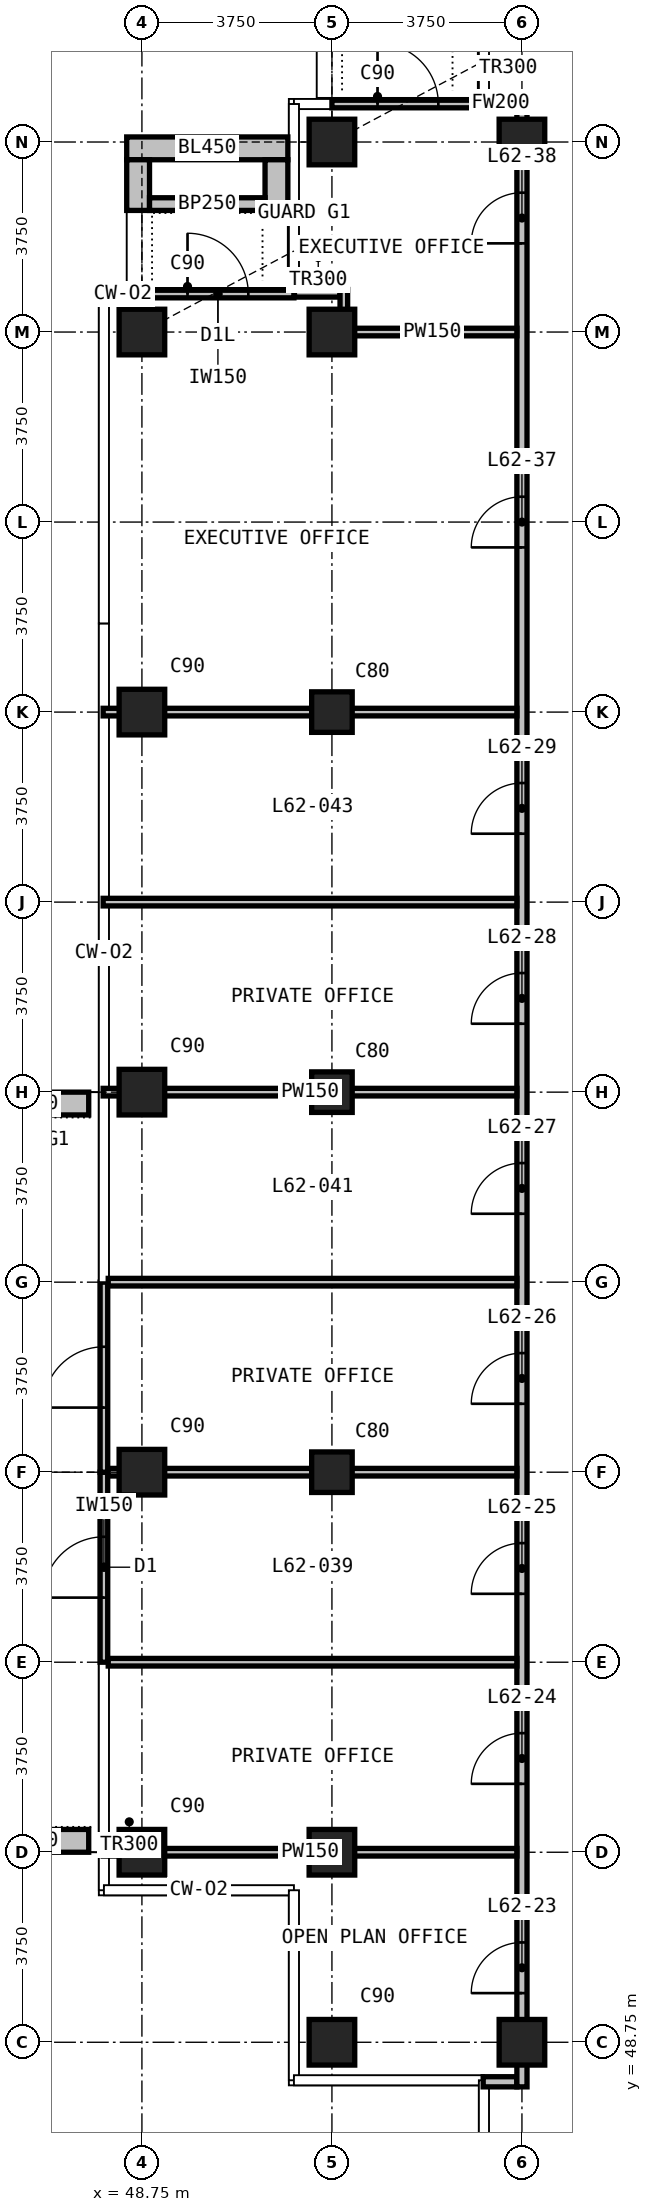
"""IFC4 building model, lengths in metres.
Left out: names, types, materials, properties, quantities, classifications, styles, units other than length and angle.
Written with IfcOpenShell. Run it as: python <this file> out.ifc"""

import sys

from ifc_helpers import new_model, si_unit, direction, frame, frame_2d, origin, origin_2d, place, context, subcontext, project, spatial, rectangle, extrude, element, fill, save


model = new_model("IFC4")
c1 = context("Model", 3, precision=1e-05, world=origin(), true_north=direction((0.0, 1.0)))
c2 = subcontext(c1, "Body", "Model", "MODEL_VIEW")
j1 = project(units=[si_unit("LENGTHUNIT", "METRE"), si_unit("PLANEANGLEUNIT", "RADIAN")], contexts=[c1])
p1 = place(None, origin())
s1 = spatial("IfcSite", under=j1, at=p1, CompositionType="ELEMENT")
p2 = place(p1, origin())
s2 = spatial("IfcBuilding", under=s1, at=p2, CompositionType="ELEMENT")
p3 = place(p2, frame((0.0, 0.0, 239.1)))
s3 = spatial("IfcBuildingStorey", under=s2, at=p3, CompositionType="ELEMENT", Elevation=239.1)
for number, where, z_axis, x_axis in (
    (1, (48.75, 52.5, 0.0), (0.0, 0.0, 1.0), (1.0, 0.0, 0.0)),
    (2, (48.75, 60.0, 0.0), (0.0, 0.0, 1.0), (1.0, 0.0, 0.0)),
    (3, (48.75, 67.5, 0.0), (0.0, 0.0, 1.0), (1.0, 0.0, 0.0)),
    (4, (48.75, 75.0, 0.0), (0.0, 0.0, 1.0), (1.0, 0.0, 0.0)),
    (5, (48.75, 82.5, 0.0), (0.0, 0.0, 1.0), (1.0, 0.0, 0.0)),
    (6, (52.5, 48.75, 0.0), (0.0, 0.0, 1.0), (1.0, 0.0, 0.0)),
    (7, (52.5, 52.5, 0.0), (0.0, 0.0, 1.0), (1.0, 0.0, 0.0)),
):
    element("IfcColumn", number, at=place(p3, frame(where, z_axis=z_axis, x_axis=x_axis)), inside=s3, PredefinedType="COLUMN", context=c2, shape_type="SweptSolid", body=[
        extrude(rectangle(XDim=0.9, YDim=0.9, at=origin_2d()), origin(), (0.0, 0.0, 1.0), 3.6),
    ])
for number, where, z_axis, x_axis in (
    (8, (52.5, 60.0, 0.0), (0.0, 0.0, 1.0), (1.0, 0.0, 0.0)),
    (9, (52.5, 67.5, 0.0), (0.0, 0.0, 1.0), (1.0, 0.0, 0.0)),
    (10, (52.5, 75.0, 0.0), (0.0, 0.0, 1.0), (1.0, 0.0, 0.0)),
):
    element("IfcColumn", number, at=place(p3, frame(where, z_axis=z_axis, x_axis=x_axis)), inside=s3, PredefinedType="COLUMN", context=c2, shape_type="SweptSolid", body=[
        extrude(rectangle(XDim=0.8, YDim=0.8, at=origin_2d()), origin(), (0.0, 0.0, 1.0), 3.6),
    ])
for number, where, z_axis, x_axis in (
    (11, (52.5, 82.5, 0.0), (0.0, 0.0, 1.0), (1.0, 0.0, 0.0)),
    (12, (52.5, 86.25, 0.0), (0.0, 0.0, 1.0), (1.0, 0.0, 0.0)),
    (13, (56.25, 48.75, 0.0), (0.0, 0.0, 1.0), (1.0, 0.0, 0.0)),
    (14, (56.25, 86.25, 0.0), (0.0, 0.0, 1.0), (1.0, 0.0, 0.0)),
):
    element("IfcColumn", number, at=place(p3, frame(where, z_axis=z_axis, x_axis=x_axis)), inside=s3, PredefinedType="COLUMN", context=c2, shape_type="SweptSolid", body=[
        extrude(rectangle(XDim=0.9, YDim=0.9, at=origin_2d()), origin(), (0.0, 0.0, 1.0), 3.6),
    ])
p4 = place(p3, frame((52.5, 87.0, 0.0), z_axis=(0.0, 0.0, 1.0), x_axis=(1.0, 0.0, 0.0)))
e15 = element("IfcWall", 15, at=p4, inside=s3, PredefinedType="SOLIDWALL", context=c2, shape_type="SweptSolid", body=[
    extrude(rectangle(XDim=3.0, YDim=0.15, at=frame_2d((1.5, 0.0))), origin(), (0.0, 0.0, 1.0), 3.3),
])
p5 = place(p4, frame((0.9, 0.0, 0.0)))
e16 = element("IfcOpeningElement", 16, at=p5, cuts=e15, PredefinedType="OPENING", context=c2, shape_type="SweptSolid", body=[
    extrude(rectangle(XDim=1.2, YDim=2.0, at=frame_2d((0.6, 1.0))), frame((0.0, 0.085, 0.0), z_axis=(0.0, -1.0, 0.0), x_axis=(1.0, 0.0, 0.0)), (0.0, 0.0, 1.0), 0.17),
])
p6 = place(p3, frame((48.75, 83.25, 0.0), z_axis=(0.0, 0.0, 1.0), x_axis=(1.0, 0.0, 0.0)))
e17 = element("IfcWall", 17, at=p6, inside=s3, PredefinedType="SOLIDWALL", context=c2, shape_type="SweptSolid", body=[
    extrude(rectangle(XDim=3.0, YDim=0.15, at=frame_2d((1.5, 0.0))), origin(), (0.0, 0.0, 1.0), 3.3),
])
p7 = place(p6, frame((0.9, 0.0, 0.0)))
e18 = element("IfcOpeningElement", 18, at=p7, cuts=e17, PredefinedType="OPENING", context=c2, shape_type="SweptSolid", body=[
    extrude(rectangle(XDim=1.2, YDim=2.0, at=frame_2d((0.6, 1.0))), frame((0.0, 0.085, 0.0), z_axis=(0.0, -1.0, 0.0), x_axis=(1.0, 0.0, 0.0)), (0.0, 0.0, 1.0), 0.17),
])
p8 = place(p3, frame((48.0, 56.25, 0.0), z_axis=(0.0, 0.0, 1.0), x_axis=(0.0, 1.0, 0.0)))
e19 = element("IfcWall", 19, at=p8, inside=s3, PredefinedType="SOLIDWALL", context=c2, shape_type="SweptSolid", body=[
    extrude(rectangle(XDim=3.75, YDim=0.15, at=frame_2d((1.875, 0.0))), origin(), (0.0, 0.0, 1.0), 3.3),
])
p9 = place(p8, frame((1.275, 0.0, 0.0)))
e20 = element("IfcOpeningElement", 20, at=p9, cuts=e19, PredefinedType="OPENING", context=c2, shape_type="SweptSolid", body=[
    extrude(rectangle(XDim=1.2, YDim=2.4, at=frame_2d((0.6, 1.2))), frame((0.0, 0.085, 0.0), z_axis=(0.0, -1.0, 0.0), x_axis=(1.0, 0.0, 0.0)), (0.0, 0.0, 1.0), 0.17),
])
p10 = place(p3, frame((48.0, 60.0, 0.0), z_axis=(0.0, 0.0, 1.0), x_axis=(0.0, 1.0, 0.0)))
e21 = element("IfcWall", 21, at=p10, inside=s3, PredefinedType="SOLIDWALL", context=c2, shape_type="SweptSolid", body=[
    extrude(rectangle(XDim=3.75, YDim=0.15, at=frame_2d((1.875, 0.0))), origin(), (0.0, 0.0, 1.0), 3.3),
])
p11 = place(p10, frame((1.275, 0.0, 0.0)))
e22 = element("IfcOpeningElement", 22, at=p11, cuts=e21, PredefinedType="OPENING", context=c2, shape_type="SweptSolid", body=[
    extrude(rectangle(XDim=1.2, YDim=2.4, at=frame_2d((0.6, 1.2))), frame((0.0, 0.085, 0.0), z_axis=(0.0, -1.0, 0.0), x_axis=(1.0, 0.0, 0.0)), (0.0, 0.0, 1.0), 0.17),
])
p12 = place(p3, frame((48.45, 86.125, 0.0), z_axis=(0.0, 0.0, 1.0), x_axis=(1.0, 0.0, 0.0)))
e23 = element("IfcWall", 23, at=p12, inside=s3, PredefinedType="USERDEFINED", context=c2, shape_type="SweptSolid", body=[
    extrude(rectangle(XDim=3.18, YDim=0.45, at=frame_2d((1.59, 0.0))), origin(), (0.0, 0.0, 1.0), 1.1),
])
for number, where, z_axis, x_axis in (
    (24, (48.675, 84.9, 0.0), (0.0, 0.0, 1.0), (0.0, 1.0, 0.0)),
    (25, (51.405, 84.9, 0.0), (0.0, 0.0, 1.0), (0.0, 1.0, 0.0)),
):
    element("IfcWall", number, at=place(p3, frame(where, z_axis=z_axis, x_axis=x_axis)), inside=s3, PredefinedType="USERDEFINED", context=c2, shape_type="SweptSolid", body=[
        extrude(rectangle(XDim=1.0, YDim=0.45, at=frame_2d((0.5, 0.0))), origin(), (0.0, 0.0, 1.0), 1.1),
    ])
p13 = place(p3, frame((48.9, 85.025, 0.0), z_axis=(0.0, 0.0, 1.0), x_axis=(1.0, 0.0, 0.0)))
e26 = element("IfcWall", 26, at=p13, inside=s3, PredefinedType="USERDEFINED", context=c2, shape_type="SweptSolid", body=[
    extrude(rectangle(XDim=2.28, YDim=0.25, at=frame_2d((1.14, 0.0))), origin(), (0.0, 0.0, 1.0), 1.0),
])
for number, where, z_axis, x_axis in (
    (27, (47.7, 52.725, 0.0), (0.0, 0.0, 1.0), (-1.0, 0.0, 0.0)),
    (28, (47.7, 67.275, 0.0), (0.0, 0.0, 1.0), (-1.0, 0.0, 0.0)),
):
    element("IfcWall", number, at=place(p3, frame(where, z_axis=z_axis, x_axis=x_axis)), inside=s3, PredefinedType="USERDEFINED", context=c2, shape_type="SweptSolid", body=[
        extrude(rectangle(XDim=2.35, YDim=0.45, at=frame_2d((1.175, 0.0))), origin(), (0.0, 0.0, 1.0), 1.1),
    ])
p14 = place(p3, frame((55.485, 47.97, 0.0), z_axis=(0.0, 0.0, 1.0), x_axis=(1.0, 0.0, 0.0)))
e29 = element("IfcWall", 29, at=p14, inside=s3, PredefinedType="PARTITIONING", context=c2, shape_type="SweptSolid", body=[
    extrude(rectangle(XDim=0.665, YDim=0.2, at=frame_2d((0.333, 0.0))), origin(), (0.0, 0.0, 1.0), 3.3),
])
p15 = place(p3, frame((55.51, 87.03, 0.0), z_axis=(0.0, 0.0, 1.0), x_axis=(1.0, 0.0, 0.0)))
e30 = element("IfcWall", 30, at=p15, inside=s3, PredefinedType="PARTITIONING", context=c2, shape_type="SweptSolid", body=[
    extrude(rectangle(XDim=0.64, YDim=0.2, at=frame_2d((0.32, 0.0))), origin(), (0.0, 0.0, 1.0), 3.3),
])
p16 = place(p3, frame((56.25, 47.87, 0.0), z_axis=(0.0, 0.0, 1.0), x_axis=(0.0, 1.0, 0.0)))
e31 = element("IfcWall", 31, at=p16, inside=s3, PredefinedType="PARTITIONING", context=c2, shape_type="SweptSolid", body=[
    extrude(rectangle(XDim=39.26, YDim=0.2, at=frame_2d((19.63, 0.0))), origin(), (0.0, 0.0, 1.0), 3.3),
])
p17 = place(p16, frame((1.85, 0.0, 0.0)))
e32 = element("IfcOpeningElement", 32, at=p17, cuts=e31, PredefinedType="OPENING", context=c2, shape_type="SweptSolid", body=[
    extrude(rectangle(XDim=1.0, YDim=2.2, at=frame_2d((0.5, 1.1))), frame((0.0, 0.11, 0.0), z_axis=(0.0, -1.0, 0.0), x_axis=(1.0, 0.0, 0.0)), (0.0, 0.0, 1.0), 0.22),
])
p18 = place(p16, frame((5.98, 0.0, 0.0)))
e33 = element("IfcOpeningElement", 33, at=p18, cuts=e31, PredefinedType="OPENING", context=c2, shape_type="SweptSolid", body=[
    extrude(rectangle(XDim=1.0, YDim=2.2, at=frame_2d((0.5, 1.1))), frame((0.0, 0.11, 0.0), z_axis=(0.0, -1.0, 0.0), x_axis=(1.0, 0.0, 0.0)), (0.0, 0.0, 1.0), 0.22),
])
p19 = place(p16, frame((9.73, 0.0, 0.0)))
e34 = element("IfcOpeningElement", 34, at=p19, cuts=e31, PredefinedType="OPENING", context=c2, shape_type="SweptSolid", body=[
    extrude(rectangle(XDim=1.0, YDim=2.2, at=frame_2d((0.5, 1.1))), frame((0.0, 0.11, 0.0), z_axis=(0.0, -1.0, 0.0), x_axis=(1.0, 0.0, 0.0)), (0.0, 0.0, 1.0), 0.22),
])
p20 = place(p16, frame((13.48, 0.0, 0.0)))
e35 = element("IfcOpeningElement", 35, at=p20, cuts=e31, PredefinedType="OPENING", context=c2, shape_type="SweptSolid", body=[
    extrude(rectangle(XDim=1.0, YDim=2.2, at=frame_2d((0.5, 1.1))), frame((0.0, 0.11, 0.0), z_axis=(0.0, -1.0, 0.0), x_axis=(1.0, 0.0, 0.0)), (0.0, 0.0, 1.0), 0.22),
])
p21 = place(p16, frame((17.23, 0.0, 0.0)))
e36 = element("IfcOpeningElement", 36, at=p21, cuts=e31, PredefinedType="OPENING", context=c2, shape_type="SweptSolid", body=[
    extrude(rectangle(XDim=1.0, YDim=2.2, at=frame_2d((0.5, 1.1))), frame((0.0, 0.11, 0.0), z_axis=(0.0, -1.0, 0.0), x_axis=(1.0, 0.0, 0.0)), (0.0, 0.0, 1.0), 0.22),
])
p22 = place(p16, frame((20.98, 0.0, 0.0)))
e37 = element("IfcOpeningElement", 37, at=p22, cuts=e31, PredefinedType="OPENING", context=c2, shape_type="SweptSolid", body=[
    extrude(rectangle(XDim=1.0, YDim=2.2, at=frame_2d((0.5, 1.1))), frame((0.0, 0.11, 0.0), z_axis=(0.0, -1.0, 0.0), x_axis=(1.0, 0.0, 0.0)), (0.0, 0.0, 1.0), 0.22),
])
p23 = place(p16, frame((24.73, 0.0, 0.0)))
e38 = element("IfcOpeningElement", 38, at=p23, cuts=e31, PredefinedType="OPENING", context=c2, shape_type="SweptSolid", body=[
    extrude(rectangle(XDim=1.0, YDim=2.2, at=frame_2d((0.5, 1.1))), frame((0.0, 0.11, 0.0), z_axis=(0.0, -1.0, 0.0), x_axis=(1.0, 0.0, 0.0)), (0.0, 0.0, 1.0), 0.22),
])
p24 = place(p16, frame((30.38, 0.0, 0.0)))
e39 = element("IfcOpeningElement", 39, at=p24, cuts=e31, PredefinedType="OPENING", context=c2, shape_type="SweptSolid", body=[
    extrude(rectangle(XDim=1.0, YDim=2.2, at=frame_2d((0.5, 1.1))), frame((0.0, 0.11, 0.0), z_axis=(0.0, -1.0, 0.0), x_axis=(1.0, 0.0, 0.0)), (0.0, 0.0, 1.0), 0.22),
])
p25 = place(p16, frame((36.38, 0.0, 0.0)))
e40 = element("IfcOpeningElement", 40, at=p25, cuts=e31, PredefinedType="OPENING", context=c2, shape_type="SweptSolid", body=[
    extrude(rectangle(XDim=1.0, YDim=2.2, at=frame_2d((0.5, 1.1))), frame((0.0, 0.11, 0.0), z_axis=(0.0, -1.0, 0.0), x_axis=(1.0, 0.0, 0.0)), (0.0, 0.0, 1.0), 0.22),
])
p26 = place(p3, frame((47.985, 52.5, 0.0), z_axis=(0.0, 0.0, 1.0), x_axis=(1.0, 0.0, 0.0)))
e41 = element("IfcWall", 41, at=p26, inside=s3, PredefinedType="PARTITIONING", context=c2, shape_type="SweptSolid", body=[
    extrude(rectangle(XDim=8.165, YDim=0.15, at=frame_2d((4.083, 0.0))), origin(), (0.0, 0.0, 1.0), 3.3),
])
for number, where, z_axis, x_axis in (
    (42, (48.085, 56.25, 0.0), (0.0, 0.0, 1.0), (1.0, 0.0, 0.0)),
    (43, (48.085, 60.0, 0.0), (0.0, 0.0, 1.0), (1.0, 0.0, 0.0)),
    (44, (48.085, 63.75, 0.0), (0.0, 0.0, 1.0), (1.0, 0.0, 0.0)),
):
    element("IfcWall", number, at=place(p3, frame(where, z_axis=z_axis, x_axis=x_axis)), inside=s3, PredefinedType="PARTITIONING", context=c2, shape_type="SweptSolid", body=[
        extrude(rectangle(XDim=8.065, YDim=0.15, at=frame_2d((4.032, 0.0))), origin(), (0.0, 0.0, 1.0), 3.3),
    ])
for number, where, z_axis, x_axis in (
    (45, (47.985, 67.5, 0.0), (0.0, 0.0, 1.0), (1.0, 0.0, 0.0)),
    (46, (47.985, 71.25, 0.0), (0.0, 0.0, 1.0), (1.0, 0.0, 0.0)),
    (47, (47.985, 75.0, 0.0), (0.0, 0.0, 1.0), (1.0, 0.0, 0.0)),
):
    element("IfcWall", number, at=place(p3, frame(where, z_axis=z_axis, x_axis=x_axis)), inside=s3, PredefinedType="PARTITIONING", context=c2, shape_type="SweptSolid", body=[
        extrude(rectangle(XDim=8.165, YDim=0.15, at=frame_2d((4.083, 0.0))), origin(), (0.0, 0.0, 1.0), 3.3),
    ])
p27 = place(p3, frame((52.81, 82.5, 0.0), z_axis=(0.0, 0.0, 1.0), x_axis=(1.0, 0.0, 0.0)))
e48 = element("IfcWall", 48, at=p27, inside=s3, PredefinedType="PARTITIONING", context=c2, shape_type="SweptSolid", body=[
    extrude(rectangle(XDim=3.34, YDim=0.15, at=frame_2d((1.67, 0.0))), origin(), (0.0, 0.0, 1.0), 3.3),
])
p28 = place(p3, frame((51.76, 83.265, 0.0), z_axis=(0.0, 0.0, 1.0), x_axis=(1.0, 0.0, 0.0)))
e49 = element("IfcWall", 49, at=p28, inside=s3, PredefinedType="PARTITIONING", context=c2, shape_type="SweptSolid", body=[
    extrude(rectangle(XDim=0.9, YDim=0.15, at=frame_2d((0.45, 0.0))), origin(), (0.0, 0.0, 1.0), 3.3),
])
p29 = place(p3, frame((52.735, 82.425, 0.0), z_axis=(0.0, 0.0, 1.0), x_axis=(0.0, 1.0, 0.0)))
e50 = element("IfcWall", 50, at=p29, inside=s3, PredefinedType="PARTITIONING", context=c2, shape_type="SweptSolid", body=[
    extrude(rectangle(XDim=0.915, YDim=0.15, at=frame_2d((0.458, 0.0))), origin(), (0.0, 0.0, 1.0), 3.3),
])
p30 = place(p5, origin())
e51 = element("IfcDoor", 51, at=p30, inside=s3, OperationType="SINGLE_SWING_LEFT", PredefinedType="DOOR", context=c2, shape_type="SweptSolid", body=[
    extrude(rectangle(XDim=1.2, YDim=2.0, at=frame_2d((0.6, 1.0))), frame((0.0, 0.025, 0.0), z_axis=(0.0, -1.0, 0.0), x_axis=(1.0, 0.0, 0.0)), (0.0, 0.0, 1.0), 0.05),
])
fill(e16, e51)
p31 = place(p7, origin())
e52 = element("IfcDoor", 52, at=p31, inside=s3, OperationType="SINGLE_SWING_LEFT", PredefinedType="DOOR", context=c2, shape_type="SweptSolid", body=[
    extrude(rectangle(XDim=1.2, YDim=2.0, at=frame_2d((0.6, 1.0))), frame((0.0, 0.025, 0.0), z_axis=(0.0, -1.0, 0.0), x_axis=(1.0, 0.0, 0.0)), (0.0, 0.0, 1.0), 0.05),
])
fill(e18, e52)
p32 = place(p9, origin())
e53 = element("IfcDoor", 53, at=p32, inside=s3, OperationType="SINGLE_SWING_LEFT", PredefinedType="DOOR", context=c2, shape_type="SweptSolid", body=[
    extrude(rectangle(XDim=1.2, YDim=2.4, at=frame_2d((0.6, 1.2))), frame((0.0, 0.025, 0.0), z_axis=(0.0, -1.0, 0.0), x_axis=(1.0, 0.0, 0.0)), (0.0, 0.0, 1.0), 0.05),
])
fill(e20, e53)
p33 = place(p11, origin())
e54 = element("IfcDoor", 54, at=p33, inside=s3, OperationType="SINGLE_SWING_LEFT", PredefinedType="DOOR", context=c2, shape_type="SweptSolid", body=[
    extrude(rectangle(XDim=1.2, YDim=2.4, at=frame_2d((0.6, 1.2))), frame((0.0, 0.025, 0.0), z_axis=(0.0, -1.0, 0.0), x_axis=(1.0, 0.0, 0.0)), (0.0, 0.0, 1.0), 0.05),
])
fill(e22, e54)
p34 = place(p17, origin())
e55 = element("IfcDoor", 55, at=p34, inside=s3, OperationType="SINGLE_SWING_LEFT", PredefinedType="DOOR", context=c2, shape_type="SweptSolid", body=[
    extrude(rectangle(XDim=1.0, YDim=2.2, at=frame_2d((0.5, 1.1))), frame((0.0, 0.025, 0.0), z_axis=(0.0, -1.0, 0.0), x_axis=(1.0, 0.0, 0.0)), (0.0, 0.0, 1.0), 0.05),
])
fill(e32, e55)
p35 = place(p18, origin())
e56 = element("IfcDoor", 56, at=p35, inside=s3, OperationType="SINGLE_SWING_LEFT", PredefinedType="DOOR", context=c2, shape_type="SweptSolid", body=[
    extrude(rectangle(XDim=1.0, YDim=2.2, at=frame_2d((0.5, 1.1))), frame((0.0, 0.025, 0.0), z_axis=(0.0, -1.0, 0.0), x_axis=(1.0, 0.0, 0.0)), (0.0, 0.0, 1.0), 0.05),
])
fill(e33, e56)
p36 = place(p19, origin())
e57 = element("IfcDoor", 57, at=p36, inside=s3, OperationType="SINGLE_SWING_RIGHT", PredefinedType="DOOR", context=c2, shape_type="SweptSolid", body=[
    extrude(rectangle(XDim=1.0, YDim=2.2, at=frame_2d((0.5, 1.1))), frame((0.0, 0.025, 0.0), z_axis=(0.0, -1.0, 0.0), x_axis=(1.0, 0.0, 0.0)), (0.0, 0.0, 1.0), 0.05),
])
fill(e34, e57)
p37 = place(p20, origin())
e58 = element("IfcDoor", 58, at=p37, inside=s3, OperationType="SINGLE_SWING_LEFT", PredefinedType="DOOR", context=c2, shape_type="SweptSolid", body=[
    extrude(rectangle(XDim=1.0, YDim=2.2, at=frame_2d((0.5, 1.1))), frame((0.0, 0.025, 0.0), z_axis=(0.0, -1.0, 0.0), x_axis=(1.0, 0.0, 0.0)), (0.0, 0.0, 1.0), 0.05),
])
fill(e35, e58)
p38 = place(p21, origin())
e59 = element("IfcDoor", 59, at=p38, inside=s3, OperationType="SINGLE_SWING_LEFT", PredefinedType="DOOR", context=c2, shape_type="SweptSolid", body=[
    extrude(rectangle(XDim=1.0, YDim=2.2, at=frame_2d((0.5, 1.1))), frame((0.0, 0.025, 0.0), z_axis=(0.0, -1.0, 0.0), x_axis=(1.0, 0.0, 0.0)), (0.0, 0.0, 1.0), 0.05),
])
fill(e36, e59)
p39 = place(p22, origin())
e60 = element("IfcDoor", 60, at=p39, inside=s3, OperationType="SINGLE_SWING_LEFT", PredefinedType="DOOR", context=c2, shape_type="SweptSolid", body=[
    extrude(rectangle(XDim=1.0, YDim=2.2, at=frame_2d((0.5, 1.1))), frame((0.0, 0.025, 0.0), z_axis=(0.0, -1.0, 0.0), x_axis=(1.0, 0.0, 0.0)), (0.0, 0.0, 1.0), 0.05),
])
fill(e37, e60)
p40 = place(p23, origin())
e61 = element("IfcDoor", 61, at=p40, inside=s3, OperationType="SINGLE_SWING_RIGHT", PredefinedType="DOOR", context=c2, shape_type="SweptSolid", body=[
    extrude(rectangle(XDim=1.0, YDim=2.2, at=frame_2d((0.5, 1.1))), frame((0.0, 0.025, 0.0), z_axis=(0.0, -1.0, 0.0), x_axis=(1.0, 0.0, 0.0)), (0.0, 0.0, 1.0), 0.05),
])
fill(e38, e61)
p41 = place(p24, origin())
e62 = element("IfcDoor", 62, at=p41, inside=s3, OperationType="SINGLE_SWING_LEFT", PredefinedType="DOOR", context=c2, shape_type="SweptSolid", body=[
    extrude(rectangle(XDim=1.0, YDim=2.2, at=frame_2d((0.5, 1.1))), frame((0.0, 0.025, 0.0), z_axis=(0.0, -1.0, 0.0), x_axis=(1.0, 0.0, 0.0)), (0.0, 0.0, 1.0), 0.05),
])
fill(e39, e62)
p42 = place(p25, origin())
e63 = element("IfcDoor", 63, at=p42, inside=s3, OperationType="SINGLE_SWING_LEFT", PredefinedType="DOOR", context=c2, shape_type="SweptSolid", body=[
    extrude(rectangle(XDim=1.0, YDim=2.2, at=frame_2d((0.5, 1.1))), frame((0.0, 0.025, 0.0), z_axis=(0.0, -1.0, 0.0), x_axis=(1.0, 0.0, 0.0)), (0.0, 0.0, 1.0), 0.05),
])
fill(e40, e63)
save(model, sys.argv[1])
